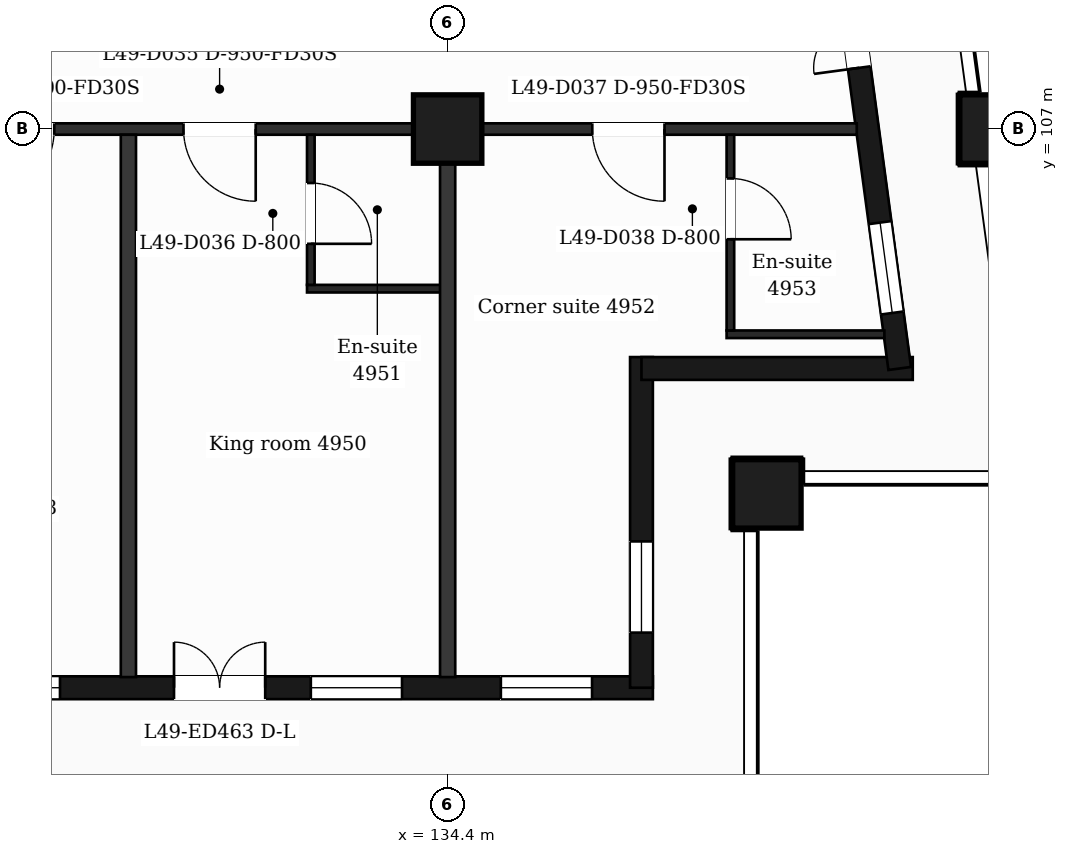
"""IFC4 building model, lengths in metres.
Left out: names, types, materials, properties, quantities, classifications, styles, units other than length and angle.
Written with IfcOpenShell. Run it as: python <this file> out.ifc"""

import sys

from ifc_helpers import new_model, si_unit, direction, frame, frame_2d, origin, origin_2d, place, context, subcontext, project, spatial, rectangle, extrude, element, fill, save


model = new_model("IFC4")
c1 = context("Model", 3, precision=1e-05, world=origin(), true_north=direction((0.0, 1.0)))
c2 = subcontext(c1, "Body", "Model", "MODEL_VIEW")
j1 = project(units=[si_unit("LENGTHUNIT", "METRE"), si_unit("PLANEANGLEUNIT", "RADIAN")], contexts=[c1])
p1 = place(None, origin())
s1 = spatial("IfcSite", under=j1, at=p1, CompositionType="ELEMENT")
p2 = place(p1, origin())
s2 = spatial("IfcBuilding", under=s1, at=p2, CompositionType="ELEMENT")
p3 = place(p2, frame((0.0, 0.0, 205.9)))
s3 = spatial("IfcBuildingStorey", under=s2, at=p3, CompositionType="ELEMENT", Elevation=205.9)
for number, where, z_axis, x_axis in (
    (1, (138.6, 102.2, 0.0), (0.0, 0.0, 1.0), (1.0, 0.0, 0.0)),
    (2, (134.4, 107.0, 0.0), (0.0, 0.0, 1.0), (1.0, 0.0, 0.0)),
    (3, (141.588, 107.0, 0.0), (0.0, 0.0, 1.0), (1.0, 0.0, 0.0)),
):
    element("IfcColumn", number, at=place(p3, frame(where, z_axis=z_axis, x_axis=x_axis)), inside=s3, PredefinedType="COLUMN", context=c2, shape_type="SweptSolid", body=[
        extrude(rectangle(XDim=0.9, YDim=0.9, at=origin_2d()), origin(), (0.0, 0.0, 1.0), 3.7),
    ])
p4 = place(p3, frame((89.85, 99.65, 0.0), z_axis=(0.0, 0.0, 1.0), x_axis=(1.0, 0.0, 0.0)))
e4 = element("IfcWall", 4, at=p4, inside=s3, PredefinedType="SOLIDWALL", context=c2, shape_type="SweptSolid", body=[
    extrude(rectangle(XDim=47.25, YDim=0.3, at=frame_2d((23.625, 0.0))), origin(), (0.0, 0.0, 1.0), 3.38),
])
p5 = place(p4, frame((0.725, 0.0, 0.9)))
e5 = element("IfcOpeningElement", 5, at=p5, cuts=e4, PredefinedType="OPENING", context=c2, shape_type="SweptSolid", body=[
    extrude(rectangle(XDim=1.2, YDim=2.1, at=frame_2d((0.6, 1.05))), frame((0.0, 0.16, 0.0), z_axis=(0.0, -1.0, 0.0), x_axis=(1.0, 0.0, 0.0)), (0.0, 0.0, 1.0), 0.32),
])
p6 = place(p4, frame((3.45, 0.0, 0.9)))
e6 = element("IfcOpeningElement", 6, at=p6, cuts=e4, PredefinedType="OPENING", context=c2, shape_type="SweptSolid", body=[
    extrude(rectangle(XDim=2.4, YDim=2.1, at=frame_2d((1.2, 1.05))), frame((0.0, 0.16, 0.0), z_axis=(0.0, -1.0, 0.0), x_axis=(1.0, 0.0, 0.0)), (0.0, 0.0, 1.0), 0.32),
])
p7 = place(p4, frame((7.65, 0.0, 0.9)))
e7 = element("IfcOpeningElement", 7, at=p7, cuts=e4, PredefinedType="OPENING", context=c2, shape_type="SweptSolid", body=[
    extrude(rectangle(XDim=2.4, YDim=2.1, at=frame_2d((1.2, 1.05))), frame((0.0, 0.16, 0.0), z_axis=(0.0, -1.0, 0.0), x_axis=(1.0, 0.0, 0.0)), (0.0, 0.0, 1.0), 0.32),
])
p8 = place(p4, frame((11.85, 0.0, 0.9)))
e8 = element("IfcOpeningElement", 8, at=p8, cuts=e4, PredefinedType="OPENING", context=c2, shape_type="SweptSolid", body=[
    extrude(rectangle(XDim=2.4, YDim=2.1, at=frame_2d((1.2, 1.05))), frame((0.0, 0.16, 0.0), z_axis=(0.0, -1.0, 0.0), x_axis=(1.0, 0.0, 0.0)), (0.0, 0.0, 1.0), 0.32),
])
p9 = place(p4, frame((16.05, 0.0, 0.9)))
e9 = element("IfcOpeningElement", 9, at=p9, cuts=e4, PredefinedType="OPENING", context=c2, shape_type="SweptSolid", body=[
    extrude(rectangle(XDim=2.4, YDim=2.1, at=frame_2d((1.2, 1.05))), frame((0.0, 0.16, 0.0), z_axis=(0.0, -1.0, 0.0), x_axis=(1.0, 0.0, 0.0)), (0.0, 0.0, 1.0), 0.32),
])
p10 = place(p4, frame((20.25, 0.0, 0.9)))
e10 = element("IfcOpeningElement", 10, at=p10, cuts=e4, PredefinedType="OPENING", context=c2, shape_type="SweptSolid", body=[
    extrude(rectangle(XDim=2.4, YDim=2.1, at=frame_2d((1.2, 1.05))), frame((0.0, 0.16, 0.0), z_axis=(0.0, -1.0, 0.0), x_axis=(1.0, 0.0, 0.0)), (0.0, 0.0, 1.0), 0.32),
])
p11 = place(p4, frame((25.05, 0.0, 0.9)))
e11 = element("IfcOpeningElement", 11, at=p11, cuts=e4, PredefinedType="OPENING", context=c2, shape_type="SweptSolid", body=[
    extrude(rectangle(XDim=1.2, YDim=2.1, at=frame_2d((0.6, 1.05))), frame((0.0, 0.16, 0.0), z_axis=(0.0, -1.0, 0.0), x_axis=(1.0, 0.0, 0.0)), (0.0, 0.0, 1.0), 0.32),
])
p12 = place(p4, frame((29.25, 0.0, 0.9)))
e12 = element("IfcOpeningElement", 12, at=p12, cuts=e4, PredefinedType="OPENING", context=c2, shape_type="SweptSolid", body=[
    extrude(rectangle(XDim=1.2, YDim=2.1, at=frame_2d((0.6, 1.05))), frame((0.0, 0.16, 0.0), z_axis=(0.0, -1.0, 0.0), x_axis=(1.0, 0.0, 0.0)), (0.0, 0.0, 1.0), 0.32),
])
p13 = place(p4, frame((32.55, 0.0, 0.0)))
e13 = element("IfcOpeningElement", 13, at=p13, cuts=e4, PredefinedType="OPENING", context=c2, shape_type="SweptSolid", body=[
    extrude(rectangle(XDim=1.2, YDim=2.4, at=frame_2d((0.6, 1.2))), frame((0.0, 0.16, 0.0), z_axis=(0.0, -1.0, 0.0), x_axis=(1.0, 0.0, 0.0)), (0.0, 0.0, 1.0), 0.32),
])
p14 = place(p4, frame((34.35, 0.0, 0.9)))
e14 = element("IfcOpeningElement", 14, at=p14, cuts=e4, PredefinedType="OPENING", context=c2, shape_type="SweptSolid", body=[
    extrude(rectangle(XDim=1.2, YDim=2.1, at=frame_2d((0.6, 1.05))), frame((0.0, 0.16, 0.0), z_axis=(0.0, -1.0, 0.0), x_axis=(1.0, 0.0, 0.0)), (0.0, 0.0, 1.0), 0.32),
])
p15 = place(p4, frame((37.05, 0.0, 0.9)))
e15 = element("IfcOpeningElement", 15, at=p15, cuts=e4, PredefinedType="OPENING", context=c2, shape_type="SweptSolid", body=[
    extrude(rectangle(XDim=2.4, YDim=2.1, at=frame_2d((1.2, 1.05))), frame((0.0, 0.16, 0.0), z_axis=(0.0, -1.0, 0.0), x_axis=(1.0, 0.0, 0.0)), (0.0, 0.0, 1.0), 0.32),
])
p16 = place(p4, frame((40.95, 0.0, 0.0)))
e16 = element("IfcOpeningElement", 16, at=p16, cuts=e4, PredefinedType="OPENING", context=c2, shape_type="SweptSolid", body=[
    extrude(rectangle(XDim=1.2, YDim=2.4, at=frame_2d((0.6, 1.2))), frame((0.0, 0.16, 0.0), z_axis=(0.0, -1.0, 0.0), x_axis=(1.0, 0.0, 0.0)), (0.0, 0.0, 1.0), 0.32),
])
p17 = place(p4, frame((42.75, 0.0, 0.9)))
e17 = element("IfcOpeningElement", 17, at=p17, cuts=e4, PredefinedType="OPENING", context=c2, shape_type="SweptSolid", body=[
    extrude(rectangle(XDim=1.2, YDim=2.1, at=frame_2d((0.6, 1.05))), frame((0.0, 0.16, 0.0), z_axis=(0.0, -1.0, 0.0), x_axis=(1.0, 0.0, 0.0)), (0.0, 0.0, 1.0), 0.32),
])
p18 = place(p4, frame((45.25, 0.0, 0.9)))
e18 = element("IfcOpeningElement", 18, at=p18, cuts=e4, PredefinedType="OPENING", context=c2, shape_type="SweptSolid", body=[
    extrude(rectangle(XDim=1.2, YDim=2.1, at=frame_2d((0.6, 1.05))), frame((0.0, 0.16, 0.0), z_axis=(0.0, -1.0, 0.0), x_axis=(1.0, 0.0, 0.0)), (0.0, 0.0, 1.0), 0.32),
])
p19 = place(p3, frame((136.95, 99.65, 0.0), z_axis=(0.0, 0.0, 1.0), x_axis=(0.0, 1.0, 0.0)))
e19 = element("IfcWall", 19, at=p19, inside=s3, PredefinedType="SOLIDWALL", context=c2, shape_type="SweptSolid", body=[
    extrude(rectangle(XDim=4.35, YDim=0.3, at=frame_2d((2.175, 0.0))), origin(), (0.0, 0.0, 1.0), 3.38),
])
p20 = place(p19, frame((0.725, 0.0, 0.9)))
e20 = element("IfcOpeningElement", 20, at=p20, cuts=e19, PredefinedType="OPENING", context=c2, shape_type="SweptSolid", body=[
    extrude(rectangle(XDim=1.2, YDim=2.1, at=frame_2d((0.6, 1.05))), frame((0.0, 0.16, 0.0), z_axis=(0.0, -1.0, 0.0), x_axis=(1.0, 0.0, 0.0)), (0.0, 0.0, 1.0), 0.32),
])
p21 = place(p3, frame((136.95, 103.85, 0.0), z_axis=(0.0, 0.0, 1.0), x_axis=(1.0, 0.0, 0.0)))
e21 = element("IfcWall", 21, at=p21, inside=s3, PredefinedType="SOLIDWALL", context=c2, shape_type="SweptSolid", body=[
    extrude(rectangle(XDim=3.569, YDim=0.3, at=frame_2d((1.785, 0.0))), origin(), (0.0, 0.0, 1.0), 3.38),
])
p22 = place(p3, frame((140.348, 103.85, 0.0), z_axis=(0.0, 0.0, 1.0), x_axis=(-0.133431549479, 0.991058031401, 0.0)))
e22 = element("IfcWall", 22, at=p22, inside=s3, PredefinedType="SOLIDWALL", context=c2, shape_type="SweptSolid", body=[
    extrude(rectangle(XDim=6.609, YDim=0.3, at=frame_2d((3.304, 0.0))), origin(), (0.0, 0.0, 1.0), 3.38),
])
p23 = place(p22, frame((0.737, 0.0, 0.9)))
e23 = element("IfcOpeningElement", 23, at=p23, cuts=e22, PredefinedType="OPENING", context=c2, shape_type="SweptSolid", body=[
    extrude(rectangle(XDim=1.2, YDim=2.1, at=frame_2d((0.6, 1.05))), frame((0.0, 0.16, 0.0), z_axis=(0.0, -1.0, 0.0), x_axis=(1.0, 0.0, 0.0)), (0.0, 0.0, 1.0), 0.32),
])
p24 = place(p22, frame((3.991, 0.0, 0.0)))
e24 = element("IfcOpeningElement", 24, at=p24, cuts=e22, PredefinedType="OPENING", context=c2, shape_type="SweptSolid", body=[
    extrude(rectangle(XDim=1.2, YDim=2.4, at=frame_2d((0.6, 1.2))), frame((0.0, 0.16, 0.0), z_axis=(0.0, -1.0, 0.0), x_axis=(1.0, 0.0, 0.0)), (0.0, 0.0, 1.0), 0.32),
])
p25 = place(p3, frame((138.07, 104.3, 0.0), z_axis=(0.0, 0.0, 1.0), x_axis=(1.0, 0.0, 0.0)))
e25 = element("IfcWall", 25, at=p25, inside=s3, PredefinedType="PARTITIONING", context=c2, shape_type="SweptSolid", body=[
    extrude(rectangle(XDim=2.076, YDim=0.1, at=frame_2d((1.038, 0.0))), origin(), (0.0, 0.0, 1.0), 3.38),
])
p26 = place(p3, frame((132.55, 104.9, 0.0), z_axis=(0.0, 0.0, 1.0), x_axis=(1.0, 0.0, 0.0)))
e26 = element("IfcWall", 26, at=p26, inside=s3, PredefinedType="PARTITIONING", context=c2, shape_type="SweptSolid", body=[
    extrude(rectangle(XDim=1.85, YDim=0.1, at=frame_2d((0.925, 0.0))), origin(), (0.0, 0.0, 1.0), 3.38),
])
p27 = place(p3, frame((87.018, 107.0, 0.0), z_axis=(0.0, 0.0, 1.0), x_axis=(1.0, 0.0, 0.0)))
e27 = element("IfcWall", 27, at=p27, inside=s3, PredefinedType="PARTITIONING", context=c2, shape_type="SweptSolid", body=[
    extrude(rectangle(XDim=52.765, YDim=0.15, at=frame_2d((26.382, 0.0))), origin(), (0.0, 0.0, 1.0), 3.38),
])
p28 = place(p27, frame((1.276, 0.0, 0.0)))
e28 = element("IfcOpeningElement", 28, at=p28, cuts=e27, PredefinedType="OPENING", context=c2, shape_type="SweptSolid", body=[
    extrude(rectangle(XDim=0.95, YDim=2.1, at=frame_2d((0.475, 1.05))), frame((0.0, 0.085, 0.0), z_axis=(0.0, -1.0, 0.0), x_axis=(1.0, 0.0, 0.0)), (0.0, 0.0, 1.0), 0.17),
])
p29 = place(p27, frame((6.369, 0.0, 0.0)))
e29 = element("IfcOpeningElement", 29, at=p29, cuts=e27, PredefinedType="OPENING", context=c2, shape_type="SweptSolid", body=[
    extrude(rectangle(XDim=0.95, YDim=2.1, at=frame_2d((0.475, 1.05))), frame((0.0, 0.085, 0.0), z_axis=(0.0, -1.0, 0.0), x_axis=(1.0, 0.0, 0.0)), (0.0, 0.0, 1.0), 0.17),
])
p30 = place(p27, frame((12.112, 0.0, 0.0)))
e30 = element("IfcOpeningElement", 30, at=p30, cuts=e27, PredefinedType="OPENING", context=c2, shape_type="SweptSolid", body=[
    extrude(rectangle(XDim=0.95, YDim=2.1, at=frame_2d((0.475, 1.05))), frame((0.0, 0.085, 0.0), z_axis=(0.0, -1.0, 0.0), x_axis=(1.0, 0.0, 0.0)), (0.0, 0.0, 1.0), 0.17),
])
p31 = place(p27, frame((14.582, 0.0, 0.0)))
e31 = element("IfcOpeningElement", 31, at=p31, cuts=e27, PredefinedType="OPENING", context=c2, shape_type="SweptSolid", body=[
    extrude(rectangle(XDim=0.95, YDim=2.1, at=frame_2d((0.475, 1.05))), frame((0.0, 0.085, 0.0), z_axis=(0.0, -1.0, 0.0), x_axis=(1.0, 0.0, 0.0)), (0.0, 0.0, 1.0), 0.17),
])
p32 = place(p27, frame((20.512, 0.0, 0.0)))
e32 = element("IfcOpeningElement", 32, at=p32, cuts=e27, PredefinedType="OPENING", context=c2, shape_type="SweptSolid", body=[
    extrude(rectangle(XDim=0.95, YDim=2.1, at=frame_2d((0.475, 1.05))), frame((0.0, 0.085, 0.0), z_axis=(0.0, -1.0, 0.0), x_axis=(1.0, 0.0, 0.0)), (0.0, 0.0, 1.0), 0.17),
])
p33 = place(p27, frame((25.157, 0.0, 0.0)))
e33 = element("IfcOpeningElement", 33, at=p33, cuts=e27, PredefinedType="OPENING", context=c2, shape_type="SweptSolid", body=[
    extrude(rectangle(XDim=0.95, YDim=2.1, at=frame_2d((0.475, 1.05))), frame((0.0, 0.085, 0.0), z_axis=(0.0, -1.0, 0.0), x_axis=(1.0, 0.0, 0.0)), (0.0, 0.0, 1.0), 0.17),
])
p34 = place(p27, frame((26.657, 0.0, 0.0)))
e34 = element("IfcOpeningElement", 34, at=p34, cuts=e27, PredefinedType="OPENING", context=c2, shape_type="SweptSolid", body=[
    extrude(rectangle(XDim=0.95, YDim=2.1, at=frame_2d((0.475, 1.05))), frame((0.0, 0.085, 0.0), z_axis=(0.0, -1.0, 0.0), x_axis=(1.0, 0.0, 0.0)), (0.0, 0.0, 1.0), 0.17),
])
p35 = place(p27, frame((31.302, 0.0, 0.0)))
e35 = element("IfcOpeningElement", 35, at=p35, cuts=e27, PredefinedType="OPENING", context=c2, shape_type="SweptSolid", body=[
    extrude(rectangle(XDim=0.95, YDim=2.1, at=frame_2d((0.475, 1.05))), frame((0.0, 0.085, 0.0), z_axis=(0.0, -1.0, 0.0), x_axis=(1.0, 0.0, 0.0)), (0.0, 0.0, 1.0), 0.17),
])
p36 = place(p27, frame((41.207, 0.0, 0.0)))
e36 = element("IfcOpeningElement", 36, at=p36, cuts=e27, PredefinedType="OPENING", context=c2, shape_type="SweptSolid", body=[
    extrude(rectangle(XDim=1.0, YDim=2.1, at=frame_2d((0.5, 1.05))), frame((0.0, 0.085, 0.0), z_axis=(0.0, -1.0, 0.0), x_axis=(1.0, 0.0, 0.0)), (0.0, 0.0, 1.0), 0.17),
])
p37 = place(p27, frame((43.907, 0.0, 0.0)))
e37 = element("IfcOpeningElement", 37, at=p37, cuts=e27, PredefinedType="OPENING", context=c2, shape_type="SweptSolid", body=[
    extrude(rectangle(XDim=0.95, YDim=2.1, at=frame_2d((0.475, 1.05))), frame((0.0, 0.085, 0.0), z_axis=(0.0, -1.0, 0.0), x_axis=(1.0, 0.0, 0.0)), (0.0, 0.0, 1.0), 0.17),
])
p38 = place(p27, frame((49.285, 0.0, 0.0)))
e38 = element("IfcOpeningElement", 38, at=p38, cuts=e27, PredefinedType="OPENING", context=c2, shape_type="SweptSolid", body=[
    extrude(rectangle(XDim=0.95, YDim=2.1, at=frame_2d((0.475, 1.05))), frame((0.0, 0.085, 0.0), z_axis=(0.0, -1.0, 0.0), x_axis=(1.0, 0.0, 0.0)), (0.0, 0.0, 1.0), 0.17),
])
p39 = place(p3, frame((130.2, 99.79, 0.0), z_axis=(0.0, 0.0, 1.0), x_axis=(0.0, 1.0, 0.0)))
e39 = element("IfcWall", 39, at=p39, inside=s3, PredefinedType="PARTITIONING", context=c2, shape_type="SweptSolid", body=[
    extrude(rectangle(XDim=7.135, YDim=0.2, at=frame_2d((3.567, 0.0))), origin(), (0.0, 0.0, 1.0), 3.38),
])
p40 = place(p3, frame((132.6, 104.95, 0.0), z_axis=(0.0, 0.0, 1.0), x_axis=(0.0, 1.0, 0.0)))
e40 = element("IfcWall", 40, at=p40, inside=s3, PredefinedType="PARTITIONING", context=c2, shape_type="SweptSolid", body=[
    extrude(rectangle(XDim=1.975, YDim=0.1, at=frame_2d((0.988, 0.0))), origin(), (0.0, 0.0, 1.0), 3.38),
])
p41 = place(p40, frame((0.54, 0.0, 0.0)))
e41 = element("IfcOpeningElement", 41, at=p41, cuts=e40, PredefinedType="OPENING", context=c2, shape_type="SweptSolid", body=[
    extrude(rectangle(XDim=0.8, YDim=2.1, at=frame_2d((0.4, 1.05))), frame((0.0, 0.06, 0.0), z_axis=(0.0, -1.0, 0.0), x_axis=(1.0, 0.0, 0.0)), (0.0, 0.0, 1.0), 0.12),
])
p42 = place(p3, frame((134.4, 99.79, 0.0), z_axis=(0.0, 0.0, 1.0), x_axis=(0.0, 1.0, 0.0)))
e42 = element("IfcWall", 42, at=p42, inside=s3, PredefinedType="PARTITIONING", context=c2, shape_type="SweptSolid", body=[
    extrude(rectangle(XDim=7.135, YDim=0.2, at=frame_2d((3.567, 0.0))), origin(), (0.0, 0.0, 1.0), 3.38),
])
p43 = place(p3, frame((138.12, 104.35, 0.0), z_axis=(0.0, 0.0, 1.0), x_axis=(0.0, 1.0, 0.0)))
e43 = element("IfcWall", 43, at=p43, inside=s3, PredefinedType="PARTITIONING", context=c2, shape_type="SweptSolid", body=[
    extrude(rectangle(XDim=2.575, YDim=0.1, at=frame_2d((1.288, 0.0))), origin(), (0.0, 0.0, 1.0), 3.38),
])
p44 = place(p43, frame((1.2, 0.0, 0.0)))
e44 = element("IfcOpeningElement", 44, at=p44, cuts=e43, PredefinedType="OPENING", context=c2, shape_type="SweptSolid", body=[
    extrude(rectangle(XDim=0.8, YDim=2.1, at=frame_2d((0.4, 1.05))), frame((0.0, 0.06, 0.0), z_axis=(0.0, -1.0, 0.0), x_axis=(1.0, 0.0, 0.0)), (0.0, 0.0, 1.0), 0.12),
])
p45 = place(p15, origin())
e45 = element("IfcWindow", 45, at=p45, inside=s3, PartitioningType="SINGLE_PANEL", PredefinedType="WINDOW", context=c2, shape_type="SweptSolid", body=[
    extrude(rectangle(XDim=2.4, YDim=2.1, at=frame_2d((1.2, 1.05))), frame((0.0, 0.03, 0.0), z_axis=(0.0, -1.0, 0.0), x_axis=(1.0, 0.0, 0.0)), (0.0, 0.0, 1.0), 0.06),
])
fill(e15, e45)
p46 = place(p16, origin())
e46 = element("IfcDoor", 46, at=p46, inside=s3, OperationType="DOUBLE_DOOR_SINGLE_SWING", PredefinedType="DOOR", context=c2, shape_type="SweptSolid", body=[
    extrude(rectangle(XDim=1.2, YDim=2.4, at=frame_2d((0.6, 1.2))), frame((0.0, 0.025, 0.0), z_axis=(0.0, -1.0, 0.0), x_axis=(1.0, 0.0, 0.0)), (0.0, 0.0, 1.0), 0.05),
])
fill(e16, e46)
p47 = place(p17, origin())
e47 = element("IfcWindow", 47, at=p47, inside=s3, PartitioningType="SINGLE_PANEL", PredefinedType="WINDOW", context=c2, shape_type="SweptSolid", body=[
    extrude(rectangle(XDim=1.2, YDim=2.1, at=frame_2d((0.6, 1.05))), frame((0.0, 0.03, 0.0), z_axis=(0.0, -1.0, 0.0), x_axis=(1.0, 0.0, 0.0)), (0.0, 0.0, 1.0), 0.06),
])
fill(e17, e47)
p48 = place(p18, origin())
e48 = element("IfcWindow", 48, at=p48, inside=s3, PartitioningType="SINGLE_PANEL", PredefinedType="WINDOW", context=c2, shape_type="SweptSolid", body=[
    extrude(rectangle(XDim=1.2, YDim=2.1, at=frame_2d((0.6, 1.05))), frame((0.0, 0.03, 0.0), z_axis=(0.0, -1.0, 0.0), x_axis=(1.0, 0.0, 0.0)), (0.0, 0.0, 1.0), 0.06),
])
fill(e18, e48)
p49 = place(p20, origin())
e49 = element("IfcWindow", 49, at=p49, inside=s3, PartitioningType="SINGLE_PANEL", PredefinedType="WINDOW", context=c2, shape_type="SweptSolid", body=[
    extrude(rectangle(XDim=1.2, YDim=2.1, at=frame_2d((0.6, 1.05))), frame((0.0, 0.03, 0.0), z_axis=(0.0, -1.0, 0.0), x_axis=(1.0, 0.0, 0.0)), (0.0, 0.0, 1.0), 0.06),
])
fill(e20, e49)
p50 = place(p23, origin())
e50 = element("IfcWindow", 50, at=p50, inside=s3, PartitioningType="SINGLE_PANEL", PredefinedType="WINDOW", context=c2, shape_type="SweptSolid", body=[
    extrude(rectangle(XDim=1.2, YDim=2.1, at=frame_2d((0.6, 1.05))), frame((0.0, 0.03, 0.0), z_axis=(0.0, -1.0, 0.0), x_axis=(1.0, 0.0, 0.0)), (0.0, 0.0, 1.0), 0.06),
])
fill(e23, e50)
p51 = place(p24, origin())
e51 = element("IfcDoor", 51, at=p51, inside=s3, OperationType="DOUBLE_DOOR_SINGLE_SWING", PredefinedType="DOOR", context=c2, shape_type="SweptSolid", body=[
    extrude(rectangle(XDim=1.2, YDim=2.4, at=frame_2d((0.6, 1.2))), frame((0.0, 0.025, 0.0), z_axis=(0.0, -1.0, 0.0), x_axis=(1.0, 0.0, 0.0)), (0.0, 0.0, 1.0), 0.05),
])
fill(e24, e51)
p52 = place(p36, origin())
e52 = element("IfcDoor", 52, at=p52, inside=s3, OperationType="SINGLE_SWING_LEFT", PredefinedType="DOOR", context=c2, shape_type="SweptSolid", body=[
    extrude(rectangle(XDim=1.0, YDim=2.1, at=frame_2d((0.5, 1.05))), frame((0.0, 0.025, 0.0), z_axis=(0.0, -1.0, 0.0), x_axis=(1.0, 0.0, 0.0)), (0.0, 0.0, 1.0), 0.05),
])
fill(e36, e52)
p53 = place(p37, origin())
e53 = element("IfcDoor", 53, at=p53, inside=s3, OperationType="SINGLE_SWING_RIGHT", PredefinedType="DOOR", context=c2, shape_type="SweptSolid", body=[
    extrude(rectangle(XDim=0.95, YDim=2.1, at=frame_2d((0.475, 1.05))), frame((0.0, 0.025, 0.0), z_axis=(0.0, -1.0, 0.0), x_axis=(1.0, 0.0, 0.0)), (0.0, 0.0, 1.0), 0.05),
])
fill(e37, e53)
p54 = place(p41, origin())
e54 = element("IfcDoor", 54, at=p54, inside=s3, OperationType="SINGLE_SWING_LEFT", PredefinedType="DOOR", context=c2, shape_type="SweptSolid", body=[
    extrude(rectangle(XDim=0.8, YDim=2.1, at=frame_2d((0.4, 1.05))), frame((0.0, 0.025, 0.0), z_axis=(0.0, -1.0, 0.0), x_axis=(1.0, 0.0, 0.0)), (0.0, 0.0, 1.0), 0.05),
])
fill(e41, e54)
p55 = place(p38, origin())
e55 = element("IfcDoor", 55, at=p55, inside=s3, OperationType="SINGLE_SWING_RIGHT", PredefinedType="DOOR", context=c2, shape_type="SweptSolid", body=[
    extrude(rectangle(XDim=0.95, YDim=2.1, at=frame_2d((0.475, 1.05))), frame((0.0, 0.025, 0.0), z_axis=(0.0, -1.0, 0.0), x_axis=(1.0, 0.0, 0.0)), (0.0, 0.0, 1.0), 0.05),
])
fill(e38, e55)
p56 = place(p44, origin())
e56 = element("IfcDoor", 56, at=p56, inside=s3, OperationType="SINGLE_SWING_LEFT", PredefinedType="DOOR", context=c2, shape_type="SweptSolid", body=[
    extrude(rectangle(XDim=0.8, YDim=2.1, at=frame_2d((0.4, 1.05))), frame((0.0, 0.025, 0.0), z_axis=(0.0, -1.0, 0.0), x_axis=(1.0, 0.0, 0.0)), (0.0, 0.0, 1.0), 0.05),
])
fill(e44, e56)
save(model, sys.argv[1])
